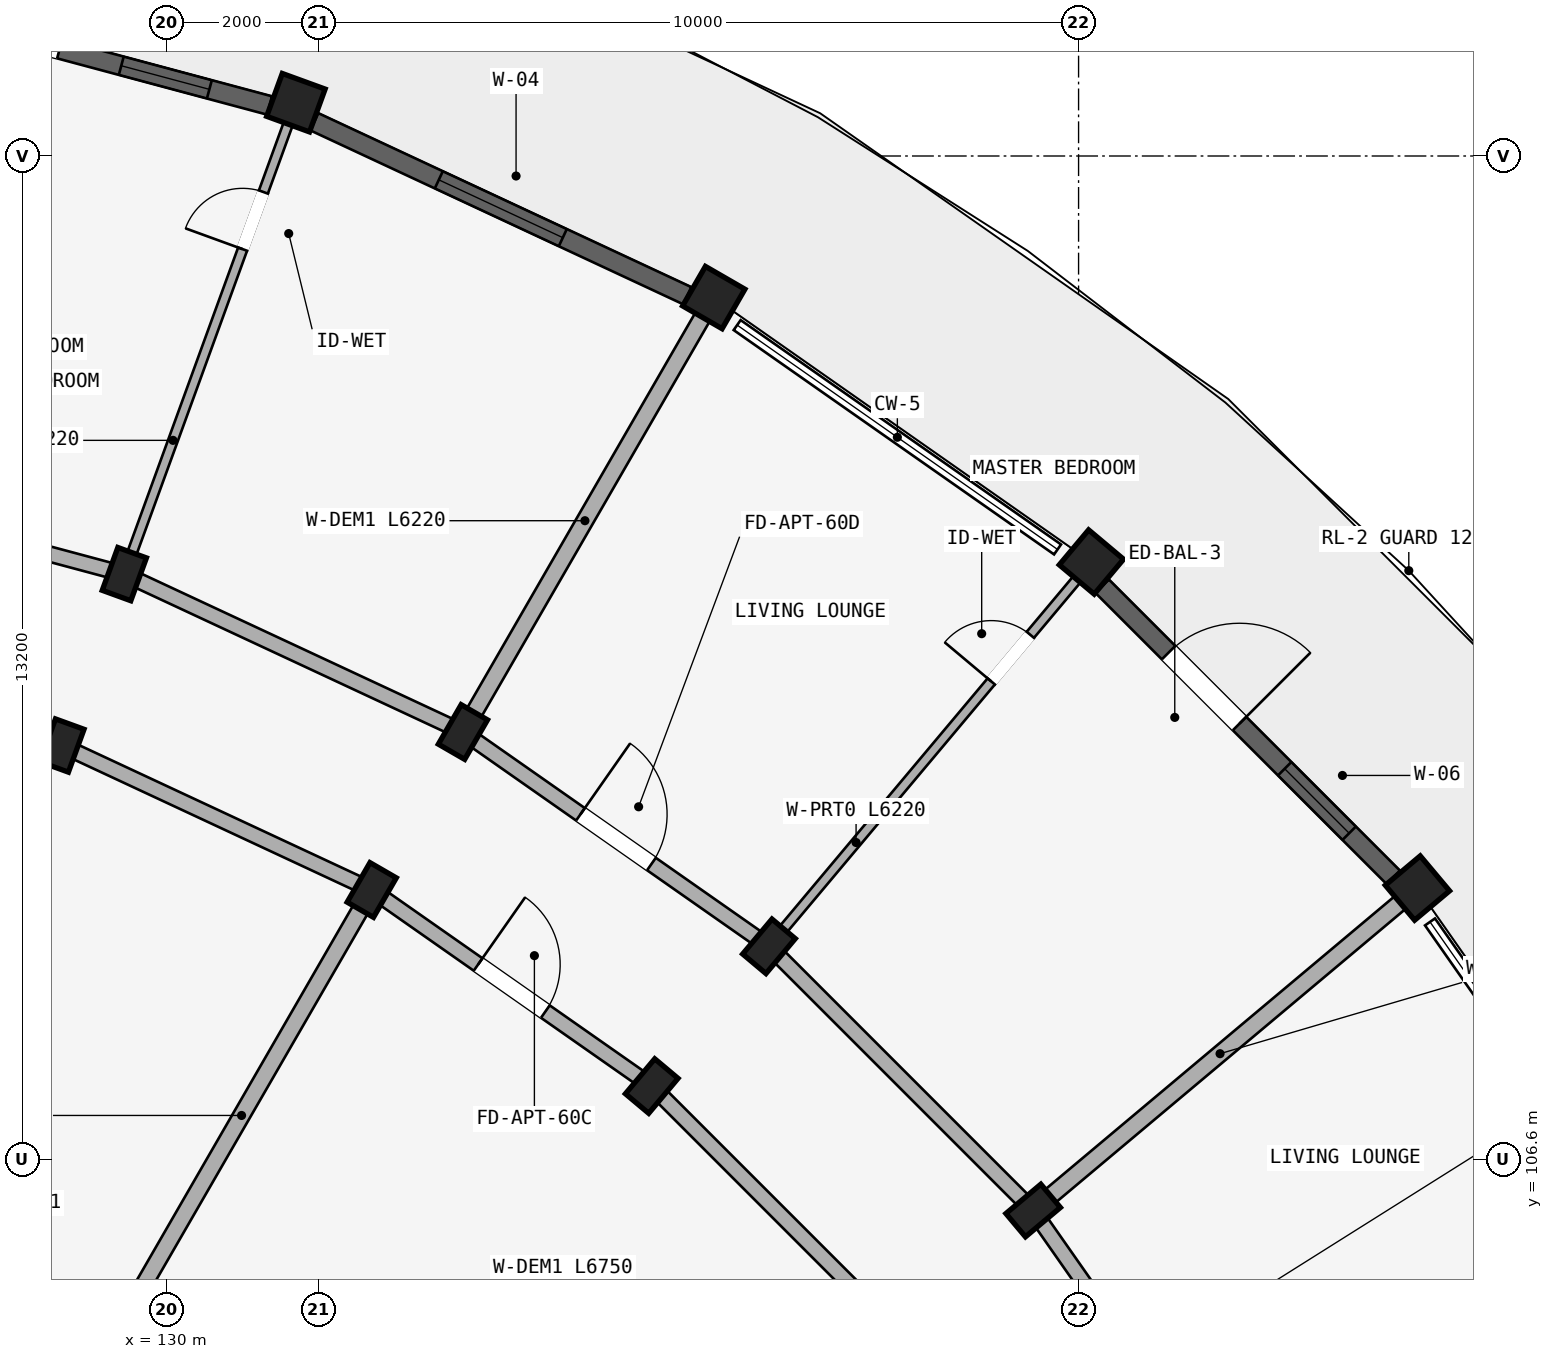
"""IFC4 building model, lengths in metres.
Left out: names, types, materials, properties, quantities, classifications, styles, units other than length and angle.
Written with IfcOpenShell. Run it as: python <this file> out.ifc"""

import sys

from ifc_helpers import new_model, si_unit, direction, frame, frame_2d, origin, origin_2d, place, context, subcontext, project, spatial, rectangle, extrude, element, fill, save


model = new_model("IFC4")
c1 = context("Model", 3, precision=1e-05, world=origin(), true_north=direction((0.0, 1.0)))
c2 = subcontext(c1, "Body", "Model", "MODEL_VIEW")
j1 = project(units=[si_unit("LENGTHUNIT", "METRE"), si_unit("PLANEANGLEUNIT", "RADIAN")], contexts=[c1])
p1 = place(None, origin())
s1 = spatial("IfcSite", under=j1, at=p1, CompositionType="ELEMENT")
p2 = place(p1, origin())
s2 = spatial("IfcBuilding", under=s1, at=p2, CompositionType="ELEMENT")
p3 = place(p2, frame((0.0, 0.0, 40.2)))
s3 = spatial("IfcBuildingStorey", under=s2, at=p3, CompositionType="ELEMENT", Elevation=40.2)
for number, where, z_axis, x_axis in (
    (1, (128.624, 112.044, 0.0), (0.0, 0.0, 1.0), (-0.94, 0.342, 0.0)),
    (2, (129.445, 114.299, 0.0), (0.0, 0.0, 1.0), (-0.94, 0.342, 0.0)),
):
    element("IfcColumn", number, at=place(p3, frame(where, z_axis=z_axis, x_axis=x_axis)), inside=s3, PredefinedType="COLUMN", context=c2, shape_type="SweptSolid", body=[
        extrude(rectangle(XDim=0.4, YDim=0.6, at=origin_2d()), origin(), (0.0, 0.0, 1.0), 2.91),
    ])
p4 = place(p3, frame((131.702, 120.501, 0.0), z_axis=(0.0, 0.0, 1.0), x_axis=(-0.939692620786, 0.342020143326, 0.0)))
e3 = element("IfcColumn", 3, at=p4, inside=s3, PredefinedType="COLUMN", context=c2, shape_type="SweptSolid", body=[
    extrude(rectangle(XDim=0.6, YDim=0.6, at=origin_2d()), origin(), (0.0, 0.0, 1.0), 2.91),
])
for number, where, z_axis, x_axis in (
    (4, (132.7, 110.144, 0.0), (0.0, 0.0, 1.0), (-0.866, 0.5, 0.0)),
    (5, (133.9, 112.222, 0.0), (0.0, 0.0, 1.0), (-0.866, 0.5, 0.0)),
):
    element("IfcColumn", number, at=place(p3, frame(where, z_axis=z_axis, x_axis=x_axis)), inside=s3, PredefinedType="COLUMN", context=c2, shape_type="SweptSolid", body=[
        extrude(rectangle(XDim=0.4, YDim=0.6, at=origin_2d()), origin(), (0.0, 0.0, 1.0), 2.91),
    ])
p5 = place(p3, frame((137.2, 117.938, 0.0), z_axis=(0.0, 0.0, 1.0), x_axis=(-0.866025403784, 0.5, 0.0)))
e6 = element("IfcColumn", 6, at=p5, inside=s3, PredefinedType="COLUMN", context=c2, shape_type="SweptSolid", body=[
    extrude(rectangle(XDim=0.6, YDim=0.6, at=origin_2d()), origin(), (0.0, 0.0, 1.0), 2.91),
])
for number, where, z_axis, x_axis in (
    (7, (136.384, 107.564, 0.0), (0.0, 0.0, 1.0), (-0.766, 0.643, 0.0)),
    (8, (137.927, 109.402, 0.0), (0.0, 0.0, 1.0), (-0.766, 0.643, 0.0)),
):
    element("IfcColumn", number, at=place(p3, frame(where, z_axis=z_axis, x_axis=x_axis)), inside=s3, PredefinedType="COLUMN", context=c2, shape_type="SweptSolid", body=[
        extrude(rectangle(XDim=0.4, YDim=0.6, at=origin_2d()), origin(), (0.0, 0.0, 1.0), 2.91),
    ])
p6 = place(p3, frame((142.169, 114.458, 0.0), z_axis=(0.0, 0.0, 1.0), x_axis=(-0.766044443119, 0.642787609687, 0.0)))
e9 = element("IfcColumn", 9, at=p6, inside=s3, PredefinedType="COLUMN", context=c2, shape_type="SweptSolid", body=[
    extrude(rectangle(XDim=0.6, YDim=0.6, at=origin_2d()), origin(), (0.0, 0.0, 1.0), 2.91),
])
p7 = place(p3, frame((141.402, 105.927, 0.0), z_axis=(0.0, 0.0, 1.0), x_axis=(-0.642787609687, 0.766044443119, 0.0)))
e10 = element("IfcColumn", 10, at=p7, inside=s3, PredefinedType="COLUMN", context=c2, shape_type="SweptSolid", body=[
    extrude(rectangle(XDim=0.4, YDim=0.6, at=origin_2d()), origin(), (0.0, 0.0, 1.0), 2.91),
])
p8 = place(p3, frame((146.458, 110.169, 0.0), z_axis=(0.0, 0.0, 1.0), x_axis=(-0.642787609687, 0.766044443119, 0.0)))
e11 = element("IfcColumn", 11, at=p8, inside=s3, PredefinedType="COLUMN", context=c2, shape_type="SweptSolid", body=[
    extrude(rectangle(XDim=0.6, YDim=0.6, at=origin_2d()), origin(), (0.0, 0.0, 1.0), 2.91),
])
p9 = place(p3, frame((124.28, 113.208, 0.0), z_axis=(0.0, 0.0, 1.0), x_axis=(0.965934240054, -0.258787642463, 0.0)))
e12 = element("IfcWall", 12, at=p9, inside=s3, PredefinedType="STANDARD", context=c2, shape_type="SweptSolid", body=[
    extrude(rectangle(XDim=4.497, YDim=0.2, at=frame_2d((2.249, 0.0))), origin(), (0.0, 0.0, 1.0), 2.352),
])
p10 = place(p3, frame((124.697, 115.572, 0.0), z_axis=(0.0, 0.0, 1.0), x_axis=(0.965930095386, -0.258803112091, 0.0)))
e13 = element("IfcWall", 13, at=p10, inside=s3, PredefinedType="STANDARD", context=c2, shape_type="SweptSolid", body=[
    extrude(rectangle(XDim=4.916, YDim=0.2, at=frame_2d((2.458, 0.0))), origin(), (0.0, 0.0, 1.0), 2.352),
])
p11 = place(p3, frame((128.624, 112.044, 0.0), z_axis=(0.0, 0.0, 1.0), x_axis=(0.906307919131, -0.422617978463, 0.0)))
e14 = element("IfcWall", 14, at=p11, inside=s3, PredefinedType="STANDARD", context=c2, shape_type="SweptSolid", body=[
    extrude(rectangle(XDim=4.497, YDim=0.2, at=frame_2d((2.249, 0.0))), origin(), (0.0, 0.0, 1.0), 2.352),
])
p12 = place(p3, frame((129.445, 114.299, 0.0), z_axis=(0.0, 0.0, 1.0), x_axis=(0.906302381024, -0.422629854778, 0.0)))
e15 = element("IfcWall", 15, at=p12, inside=s3, PredefinedType="STANDARD", context=c2, shape_type="SweptSolid", body=[
    extrude(rectangle(XDim=4.915, YDim=0.2, at=frame_2d((2.458, 0.0))), origin(), (0.0, 0.0, 1.0), 2.352),
])
p13 = place(p3, frame((132.7, 110.144, 0.0), z_axis=(0.0, 0.0, 1.0), x_axis=(0.819155404658, -0.573571637217, 0.0)))
e16 = element("IfcWall", 16, at=p13, inside=s3, PredefinedType="STANDARD", context=c2, shape_type="SweptSolid", body=[
    extrude(rectangle(XDim=4.497, YDim=0.2, at=frame_2d((2.249, 0.0))), origin(), (0.0, 0.0, 1.0), 2.352),
])
p14 = place(p13, frame((1.709, 0.0, 0.0)))
e17 = element("IfcOpeningElement", 17, at=p14, cuts=e16, PredefinedType="OPENING", context=c2, shape_type="SweptSolid", body=[
    extrude(rectangle(XDim=1.08, YDim=2.15, at=frame_2d((0.54, 1.075))), frame((0.0, 0.11, 0.0), z_axis=(0.0, -1.0, 0.0), x_axis=(1.0, 0.0, 0.0)), (0.0, 0.0, 1.0), 0.22),
])
p15 = place(p3, frame((133.9, 112.222, 0.0), z_axis=(0.0, 0.0, 1.0), x_axis=(0.819140911474, -0.573592335331, 0.0)))
e18 = element("IfcWall", 18, at=p15, inside=s3, PredefinedType="STANDARD", context=c2, shape_type="SweptSolid", body=[
    extrude(rectangle(XDim=4.916, YDim=0.2, at=frame_2d((2.458, 0.0))), origin(), (0.0, 0.0, 1.0), 2.352),
])
p16 = place(p15, frame((1.888, 0.0, 0.0)))
e19 = element("IfcOpeningElement", 19, at=p16, cuts=e18, PredefinedType="OPENING", context=c2, shape_type="SweptSolid", body=[
    extrude(rectangle(XDim=1.14, YDim=2.15, at=frame_2d((0.57, 1.075))), frame((0.0, 0.11, 0.0), z_axis=(0.0, -1.0, 0.0), x_axis=(1.0, 0.0, 0.0)), (0.0, 0.0, 1.0), 0.22),
])
p17 = place(p3, frame((136.384, 107.564, 0.0), z_axis=(0.0, 0.0, 1.0), x_axis=(0.707106781187, -0.707106781187, 0.0)))
e20 = element("IfcWall", 20, at=p17, inside=s3, PredefinedType="STANDARD", context=c2, shape_type="SweptSolid", body=[
    extrude(rectangle(XDim=4.497, YDim=0.2, at=frame_2d((2.249, 0.0))), origin(), (0.0, 0.0, 1.0), 2.352),
])
p18 = place(p3, frame((137.927, 109.402, 0.0), z_axis=(0.0, 0.0, 1.0), x_axis=(0.707106781187, -0.707106781187, 0.0)))
e21 = element("IfcWall", 21, at=p18, inside=s3, PredefinedType="STANDARD", context=c2, shape_type="SweptSolid", body=[
    extrude(rectangle(XDim=4.916, YDim=0.2, at=frame_2d((2.458, 0.0))), origin(), (0.0, 0.0, 1.0), 2.352),
])
p19 = place(p3, frame((141.402, 105.927, 0.0), z_axis=(0.0, 0.0, 1.0), x_axis=(0.573592335331, -0.819140911474, 0.0)))
e22 = element("IfcWall", 22, at=p19, inside=s3, PredefinedType="STANDARD", context=c2, shape_type="SweptSolid", body=[
    extrude(rectangle(XDim=4.916, YDim=0.2, at=frame_2d((2.458, 0.0))), origin(), (0.0, 0.0, 1.0), 2.352),
])
p20 = place(p19, frame((1.958, 0.0, 0.0)))
e23 = element("IfcOpeningElement", 23, at=p20, cuts=e22, PredefinedType="OPENING", context=c2, shape_type="SweptSolid", body=[
    extrude(rectangle(XDim=1.0, YDim=2.15, at=frame_2d((0.5, 1.075))), frame((0.0, 0.11, 0.0), z_axis=(0.0, -1.0, 0.0), x_axis=(1.0, 0.0, 0.0)), (0.0, 0.0, 1.0), 0.22),
])
p21 = place(p3, frame((129.479, 114.393, 0.0), z_axis=(0.0, 0.0, 1.0), x_axis=(0.341992021352, 0.939702855871, 0.0)))
e24 = element("IfcWall", 24, at=p21, inside=s3, PredefinedType="PARTITIONING", context=c2, shape_type="SweptSolid", body=[
    extrude(rectangle(XDim=6.22, YDim=0.125, at=frame_2d((3.11, 0.0))), origin(), (0.0, 0.0, 1.0), 2.352),
])
p22 = place(p21, frame((4.45, 0.0, 0.0)))
e25 = element("IfcOpeningElement", 25, at=p22, cuts=e24, PredefinedType="OPENING", context=c2, shape_type="SweptSolid", body=[
    extrude(rectangle(XDim=0.8, YDim=2.1, at=frame_2d((0.4, 1.05))), frame((0.0, 0.073, 0.0), z_axis=(0.0, -1.0, 0.0), x_axis=(1.0, 0.0, 0.0)), (0.0, 0.0, 1.0), 0.145),
])
p23 = place(p3, frame((129.3, 104.254, 0.0), z_axis=(0.0, 0.0, 1.0), x_axis=(0.499997969693, 0.866026575979, 0.0)))
e26 = element("IfcWall", 26, at=p23, inside=s3, PredefinedType="STANDARD", context=c2, shape_type="SweptSolid", body=[
    extrude(rectangle(XDim=6.75, YDim=0.22, at=frame_2d((3.375, 0.0))), origin(), (0.0, 0.0, 1.0), 2.352),
])
p24 = place(p3, frame((133.95, 112.309, 0.0), z_axis=(0.0, 0.0, 1.0), x_axis=(0.500010116563, 0.866019562905, 0.0)))
e27 = element("IfcWall", 27, at=p24, inside=s3, PredefinedType="STANDARD", context=c2, shape_type="SweptSolid", body=[
    extrude(rectangle(XDim=6.22, YDim=0.22, at=frame_2d((3.11, 0.0))), origin(), (0.0, 0.0, 1.0), 2.352),
])
p25 = place(p3, frame((137.991, 109.479, 0.0), z_axis=(0.0, 0.0, 1.0), x_axis=(0.642771313427, 0.766058117009, 0.0)))
e28 = element("IfcWall", 28, at=p25, inside=s3, PredefinedType="PARTITIONING", context=c2, shape_type="SweptSolid", body=[
    extrude(rectangle(XDim=6.22, YDim=0.125, at=frame_2d((3.11, 0.0))), origin(), (0.0, 0.0, 1.0), 2.352),
])
p26 = place(p25, frame((4.45, 0.0, 0.0)))
e29 = element("IfcOpeningElement", 29, at=p26, cuts=e28, PredefinedType="OPENING", context=c2, shape_type="SweptSolid", body=[
    extrude(rectangle(XDim=0.8, YDim=2.1, at=frame_2d((0.4, 1.05))), frame((0.0, 0.073, 0.0), z_axis=(0.0, -1.0, 0.0), x_axis=(1.0, 0.0, 0.0)), (0.0, 0.0, 1.0), 0.145),
])
p27 = place(p3, frame((141.479, 105.991, 0.0), z_axis=(0.0, 0.0, 1.0), x_axis=(0.766058117009, 0.642771313427, 0.0)))
e30 = element("IfcWall", 30, at=p27, inside=s3, PredefinedType="STANDARD", context=c2, shape_type="SweptSolid", body=[
    extrude(rectangle(XDim=6.22, YDim=0.22, at=frame_2d((3.11, 0.0))), origin(), (0.0, 0.0, 1.0), 2.352),
])
p28 = place(p3, frame((144.309, 101.95, 0.0), z_axis=(0.0, 0.0, 1.0), x_axis=(0.866019562905, 0.500010116563, 0.0)))
e31 = element("IfcWall", 31, at=p28, inside=s3, PredefinedType="PARTITIONING", context=c2, shape_type="SweptSolid", body=[
    extrude(rectangle(XDim=6.22, YDim=0.125, at=frame_2d((3.11, 0.0))), origin(), (0.0, 0.0, 1.0), 2.352),
])
p29 = place(p28, frame((4.45, 0.0, 0.0)))
e32 = element("IfcOpeningElement", 32, at=p29, cuts=e31, PredefinedType="OPENING", context=c2, shape_type="SweptSolid", body=[
    extrude(rectangle(XDim=0.8, YDim=2.1, at=frame_2d((0.4, 1.05))), frame((0.0, 0.073, 0.0), z_axis=(0.0, -1.0, 0.0), x_axis=(1.0, 0.0, 0.0)), (0.0, 0.0, 1.0), 0.145),
])
p30 = place(p3, frame((126.125, 121.866, 0.0), z_axis=(0.0, 0.0, 1.0), x_axis=(0.965928932241, -0.258807453254, 0.0)))
e33 = element("IfcWall", 33, at=p30, inside=s3, PredefinedType="STANDARD", context=c2, shape_type="SweptSolid", body=[
    extrude(rectangle(XDim=5.415, YDim=0.25, at=frame_2d((2.708, 0.0))), origin(), (0.0, 0.0, 1.0), 2.452),
])
p31 = place(p30, frame((3.395, 0.0, 0.502)))
e34 = element("IfcOpeningElement", 34, at=p31, cuts=e33, PredefinedType="OPENING", context=c2, shape_type="SweptSolid", body=[
    extrude(rectangle(XDim=1.2, YDim=1.5, at=frame_2d((0.6, 0.75))), frame((0.0, 0.135, 0.0), z_axis=(0.0, -1.0, 0.0), x_axis=(1.0, 0.0, 0.0)), (0.0, 0.0, 1.0), 0.27),
])
p32 = place(p30, frame((1.235, 0.0, 0.0)))
e35 = element("IfcOpeningElement", 35, at=p32, cuts=e33, PredefinedType="OPENING", context=c2, shape_type="SweptSolid", body=[
    extrude(rectangle(XDim=1.32, YDim=2.15, at=frame_2d((0.66, 1.075))), frame((0.0, 0.135, 0.0), z_axis=(0.0, -1.0, 0.0), x_axis=(1.0, 0.0, 0.0)), (0.0, 0.0, 1.0), 0.27),
])
p33 = place(p3, frame((131.945, 120.25, 0.0), z_axis=(0.0, 0.0, 1.0), x_axis=(0.90629483869, -0.42264602845, 0.0)))
e36 = element("IfcWall", 36, at=p33, inside=s3, PredefinedType="STANDARD", context=c2, shape_type="SweptSolid", body=[
    extrude(rectangle(XDim=5.415, YDim=0.25, at=frame_2d((2.708, 0.0))), origin(), (0.0, 0.0, 1.0), 2.452),
])
p34 = place(p33, frame((1.807, 0.0, 0.602)))
e37 = element("IfcOpeningElement", 37, at=p34, cuts=e36, PredefinedType="OPENING", context=c2, shape_type="SweptSolid", body=[
    extrude(rectangle(XDim=1.8, YDim=1.65, at=frame_2d((0.9, 0.825))), frame((0.0, 0.135, 0.0), z_axis=(0.0, -1.0, 0.0), x_axis=(1.0, 0.0, 0.0)), (0.0, 0.0, 1.0), 0.27),
])
p35 = place(p3, frame((142.311, 114.14, 0.0), z_axis=(0.0, 0.0, 1.0), x_axis=(0.707106781187, -0.707106781187, 0.0)))
e38 = element("IfcWall", 38, at=p35, inside=s3, PredefinedType="STANDARD", context=c2, shape_type="SweptSolid", body=[
    extrude(rectangle(XDim=5.415, YDim=0.25, at=frame_2d((2.708, 0.0))), origin(), (0.0, 0.0, 1.0), 2.452),
])
p36 = place(p35, frame((3.395, 0.0, 0.502)))
e39 = element("IfcOpeningElement", 39, at=p36, cuts=e38, PredefinedType="OPENING", context=c2, shape_type="SweptSolid", body=[
    extrude(rectangle(XDim=1.2, YDim=1.5, at=frame_2d((0.6, 0.75))), frame((0.0, 0.135, 0.0), z_axis=(0.0, -1.0, 0.0), x_axis=(1.0, 0.0, 0.0)), (0.0, 0.0, 1.0), 0.27),
])
p37 = place(p35, frame((1.235, 0.0, 0.0)))
e40 = element("IfcOpeningElement", 40, at=p37, cuts=e38, PredefinedType="OPENING", context=c2, shape_type="SweptSolid", body=[
    extrude(rectangle(XDim=1.32, YDim=2.15, at=frame_2d((0.66, 1.075))), frame((0.0, 0.135, 0.0), z_axis=(0.0, -1.0, 0.0), x_axis=(1.0, 0.0, 0.0)), (0.0, 0.0, 1.0), 0.27),
])
p38 = place(p3, frame((126.535, 105.462, 0.0), z_axis=(0.0, 0.0, 1.0), x_axis=(0.906302358412, -0.422629903269, 0.0)))
e41 = element("IfcWall", 41, at=p38, inside=s3, PredefinedType="STANDARD", context=c2, shape_type="SweptSolid", body=[
    extrude(rectangle(XDim=2.72, YDim=0.25, at=frame_2d((1.36, 0.0))), origin(), (0.0, 0.0, 1.0), 2.452),
])
p39 = place(p38, frame((0.76, 0.0, 0.0)))
e42 = element("IfcOpeningElement", 42, at=p39, cuts=e41, PredefinedType="OPENING", context=c2, shape_type="SweptSolid", body=[
    extrude(rectangle(XDim=1.2, YDim=2.15, at=frame_2d((0.6, 1.075))), frame((0.0, 0.135, 0.0), z_axis=(0.0, -1.0, 0.0), x_axis=(1.0, 0.0, 0.0)), (0.0, 0.0, 1.0), 0.27),
])
p40 = place(p31, origin())
e43 = element("IfcWindow", 43, at=p40, inside=s3, PartitioningType="SINGLE_PANEL", PredefinedType="WINDOW", context=c2, shape_type="SweptSolid", body=[
    extrude(rectangle(XDim=1.2, YDim=1.5, at=frame_2d((0.6, 0.75))), frame((0.0, 0.03, 0.0), z_axis=(0.0, -1.0, 0.0), x_axis=(1.0, 0.0, 0.0)), (0.0, 0.0, 1.0), 0.06),
])
fill(e34, e43)
p41 = place(p34, origin())
e44 = element("IfcWindow", 44, at=p41, inside=s3, PartitioningType="DOUBLE_PANEL_VERTICAL", PredefinedType="WINDOW", context=c2, shape_type="SweptSolid", body=[
    extrude(rectangle(XDim=1.8, YDim=1.65, at=frame_2d((0.9, 0.825))), frame((0.0, 0.03, 0.0), z_axis=(0.0, -1.0, 0.0), x_axis=(1.0, 0.0, 0.0)), (0.0, 0.0, 1.0), 0.06),
])
fill(e37, e44)
p42 = place(p36, origin())
e45 = element("IfcWindow", 45, at=p42, inside=s3, PartitioningType="SINGLE_PANEL", PredefinedType="WINDOW", context=c2, shape_type="SweptSolid", body=[
    extrude(rectangle(XDim=1.2, YDim=1.5, at=frame_2d((0.6, 0.75))), frame((0.0, 0.03, 0.0), z_axis=(0.0, -1.0, 0.0), x_axis=(1.0, 0.0, 0.0)), (0.0, 0.0, 1.0), 0.06),
])
fill(e39, e45)
p43 = place(p22, origin())
e46 = element("IfcDoor", 46, at=p43, inside=s3, OperationType="SINGLE_SWING_LEFT", PredefinedType="DOOR", context=c2, shape_type="SweptSolid", body=[
    extrude(rectangle(XDim=0.8, YDim=2.1, at=frame_2d((0.4, 1.05))), frame((0.0, 0.025, 0.0), z_axis=(0.0, -1.0, 0.0), x_axis=(1.0, 0.0, 0.0)), (0.0, 0.0, 1.0), 0.05),
])
fill(e25, e46)
p44 = place(p26, frame((0.8, 0.0, 0.0), z_axis=(0.0, 0.0, 1.0), x_axis=(-1.0, 0.0, 0.0)))
e47 = element("IfcDoor", 47, at=p44, inside=s3, OperationType="SINGLE_SWING_RIGHT", PredefinedType="DOOR", context=c2, shape_type="SweptSolid", body=[
    extrude(rectangle(XDim=0.8, YDim=2.1, at=frame_2d((0.4, 1.05))), frame((0.0, 0.025, 0.0), z_axis=(0.0, -1.0, 0.0), x_axis=(1.0, 0.0, 0.0)), (0.0, 0.0, 1.0), 0.05),
])
fill(e29, e47)
p45 = place(p16, frame((1.14, 0.0, 0.0), z_axis=(0.0, 0.0, 1.0), x_axis=(-1.0, 0.0, 0.0)))
e48 = element("IfcDoor", 48, at=p45, inside=s3, OperationType="SINGLE_SWING_RIGHT", PredefinedType="DOOR", context=c2, shape_type="SweptSolid", body=[
    extrude(rectangle(XDim=1.14, YDim=2.15, at=frame_2d((0.57, 1.075))), frame((0.0, 0.025, 0.0), z_axis=(0.0, -1.0, 0.0), x_axis=(1.0, 0.0, 0.0)), (0.0, 0.0, 1.0), 0.05),
])
fill(e19, e48)
p46 = place(p14, frame((1.08, 0.0, 0.0), z_axis=(0.0, 0.0, 1.0), x_axis=(-1.0, 0.0, 0.0)))
e49 = element("IfcDoor", 49, at=p46, inside=s3, OperationType="SINGLE_SWING_RIGHT", PredefinedType="DOOR", context=c2, shape_type="SweptSolid", body=[
    extrude(rectangle(XDim=1.08, YDim=2.15, at=frame_2d((0.54, 1.075))), frame((0.0, 0.025, 0.0), z_axis=(0.0, -1.0, 0.0), x_axis=(1.0, 0.0, 0.0)), (0.0, 0.0, 1.0), 0.05),
])
fill(e17, e49)
p47 = place(p37, origin())
e50 = element("IfcDoor", 50, at=p47, inside=s3, OperationType="SINGLE_SWING_RIGHT", PredefinedType="DOOR", context=c2, shape_type="SweptSolid", body=[
    extrude(rectangle(XDim=1.32, YDim=2.15, at=frame_2d((0.66, 1.075))), frame((0.0, 0.025, 0.0), z_axis=(0.0, -1.0, 0.0), x_axis=(1.0, 0.0, 0.0)), (0.0, 0.0, 1.0), 0.05),
])
fill(e40, e50)
save(model, sys.argv[1])
